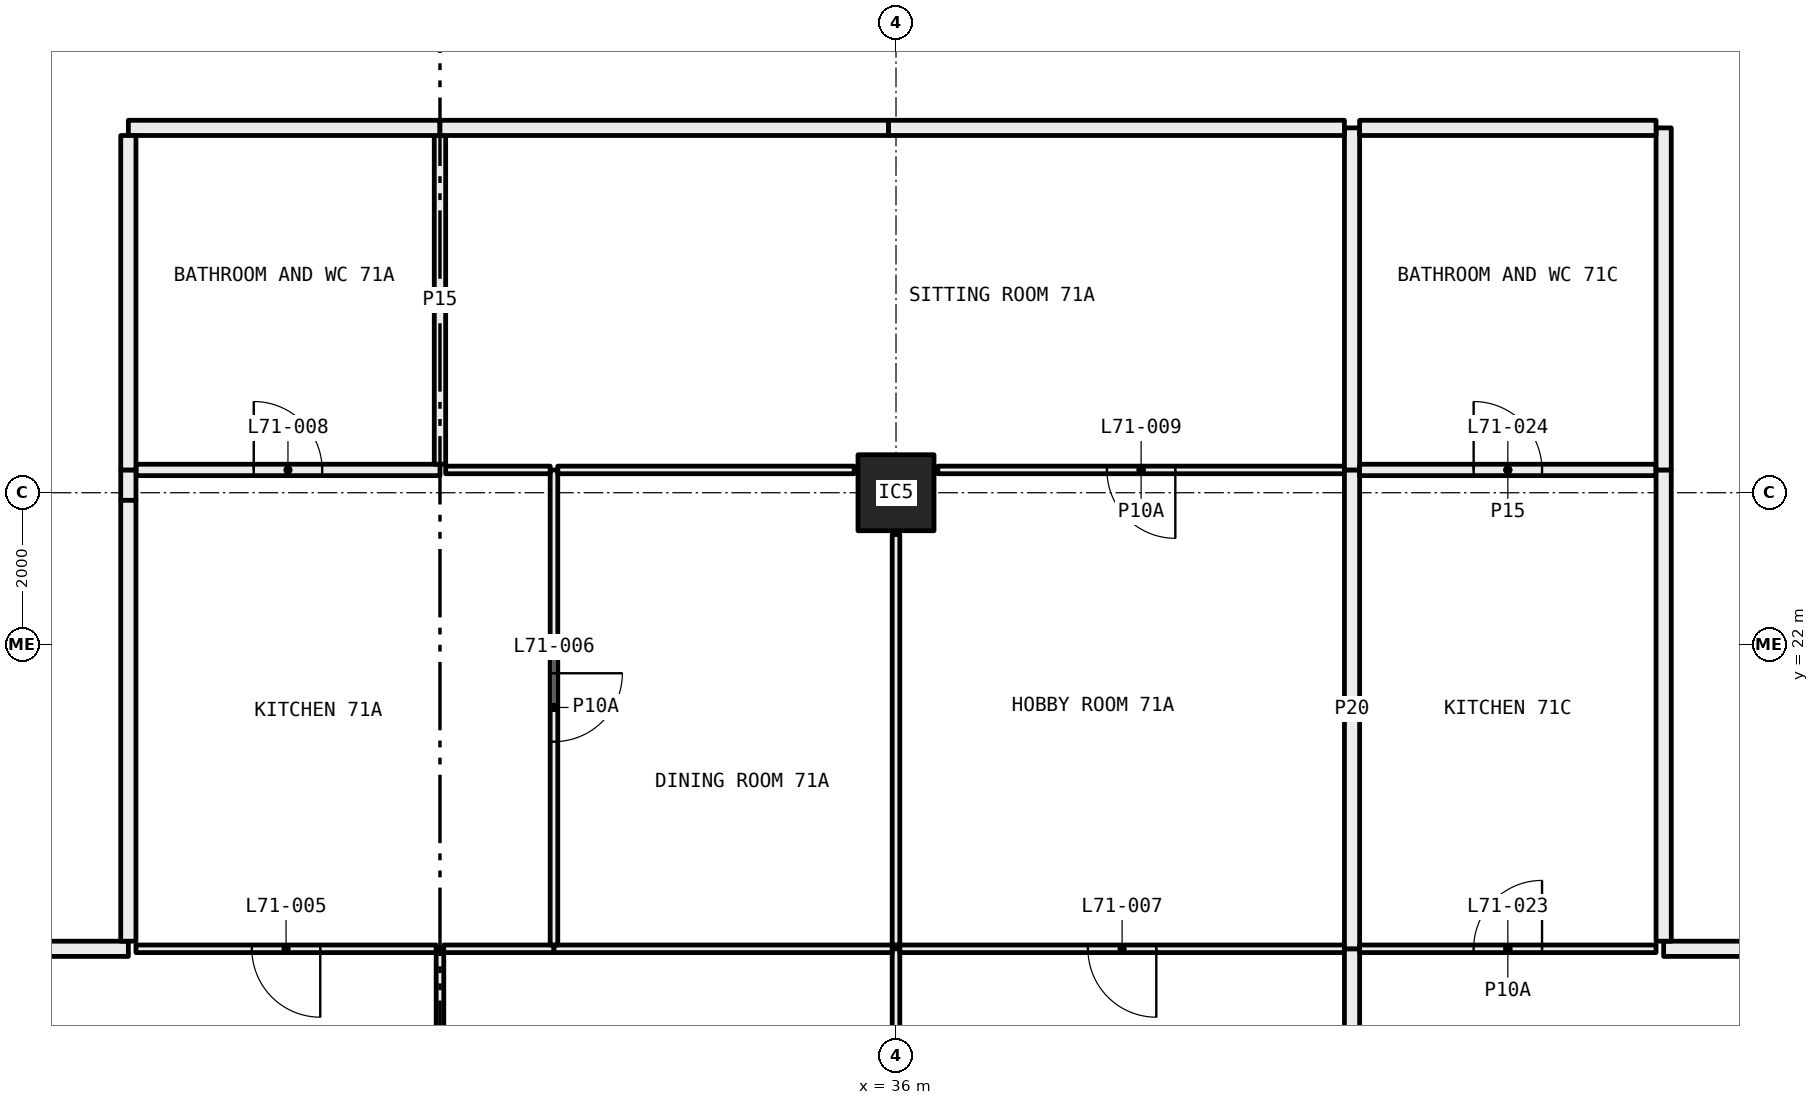
"""IFC4 building model, lengths in metres.
Left out: names, types, materials, properties, quantities, classifications, styles, units other than length and angle.
Written with IfcOpenShell. Run it as: python <this file> out.ifc"""

import sys

from ifc_helpers import new_model, si_unit, direction, frame, frame_2d, origin, origin_2d, place, context, subcontext, project, spatial, rectangle, hollow_rectangle, extrude, element, fill, save


model = new_model("IFC4")
c1 = context("Model", 3, precision=1e-05, world=origin(), true_north=direction((0.0, 1.0)))
c2 = subcontext(c1, "Body", "Model", "MODEL_VIEW")
j1 = project(units=[si_unit("LENGTHUNIT", "METRE"), si_unit("PLANEANGLEUNIT", "RADIAN")], contexts=[c1])
p1 = place(None, origin())
s1 = spatial("IfcSite", under=j1, at=p1, CompositionType="ELEMENT")
p2 = place(p1, origin())
s2 = spatial("IfcBuilding", under=s1, at=p2, CompositionType="ELEMENT")
p3 = place(p2, frame((0.0, 0.0, 262.8)))
s3 = spatial("IfcBuildingStorey", under=s2, at=p3, CompositionType="ELEMENT", Elevation=262.8)
p4 = place(p3, frame((36.0, 24.0, 0.0), z_axis=(0.0, 0.0, 1.0), x_axis=(1.0, 0.0, 0.0)))
e1 = element("IfcColumn", 1, at=p4, inside=s3, PredefinedType="COLUMN", context=c2, shape_type="SweptSolid", body=[
    extrude(hollow_rectangle(XDim=1.0, YDim=1.0, WallThickness=0.04, at=origin_2d()), origin(), (0.0, 0.0, 1.0), 3.05),
])
p5 = place(p3, frame((30.0, 12.72, 0.0), z_axis=(0.0, 0.0, 1.0), x_axis=(0.0, 1.0, 0.0)))
e2 = element("IfcWall", 2, at=p5, inside=s3, PredefinedType="PARTITIONING", context=c2, shape_type="SweptSolid", body=[
    extrude(rectangle(XDim=5.28, YDim=0.1, at=frame_2d((2.64, 0.0))), origin(), (0.0, 0.0, 1.0), 3.05),
])
p6 = place(p5, frame((2.19, 0.0, 0.0)))
e3 = element("IfcOpeningElement", 3, at=p6, cuts=e2, PredefinedType="OPENING", context=c2, shape_type="SweptSolid", body=[
    extrude(rectangle(XDim=0.9, YDim=2.1, at=frame_2d((0.45, 1.05))), frame((0.0, 0.06, 0.0), z_axis=(0.0, -1.0, 0.0), x_axis=(1.0, 0.0, 0.0)), (0.0, 0.0, 1.0), 0.12),
])
p7 = place(p3, frame((29.95, 18.0, 0.0), z_axis=(0.0, 0.0, 1.0), x_axis=(-1.0, 0.0, 0.0)))
e4 = element("IfcWall", 4, at=p7, inside=s3, PredefinedType="PARTITIONING", context=c2, shape_type="SweptSolid", body=[
    extrude(rectangle(XDim=3.95, YDim=0.1, at=frame_2d((1.975, 0.0))), origin(), (0.0, 0.0, 1.0), 3.05),
])
p8 = place(p7, frame((1.525, 0.0, 0.0)))
e5 = element("IfcOpeningElement", 5, at=p8, cuts=e4, PredefinedType="OPENING", context=c2, shape_type="SweptSolid", body=[
    extrude(rectangle(XDim=0.9, YDim=2.1, at=frame_2d((0.45, 1.05))), frame((0.0, 0.06, 0.0), z_axis=(0.0, -1.0, 0.0), x_axis=(1.0, 0.0, 0.0)), (0.0, 0.0, 1.0), 0.12),
])
p9 = place(p3, frame((25.9, 18.0, 0.0), z_axis=(0.0, 0.0, 1.0), x_axis=(-1.0, 0.0, 0.0)))
e6 = element("IfcWall", 6, at=p9, inside=s3, PredefinedType="PARTITIONING", context=c2, shape_type="SweptSolid", body=[
    extrude(rectangle(XDim=1.9, YDim=0.2, at=frame_2d((0.95, 0.0))), origin(), (0.0, 0.0, 1.0), 3.05),
])
p10 = place(p3, frame((36.0, 12.72, 0.0), z_axis=(0.0, 0.0, 1.0), x_axis=(0.0, 1.0, 0.0)))
e7 = element("IfcWall", 7, at=p10, inside=s3, PredefinedType="PARTITIONING", context=c2, shape_type="SweptSolid", body=[
    extrude(rectangle(XDim=5.28, YDim=0.1, at=frame_2d((2.64, 0.0))), origin(), (0.0, 0.0, 1.0), 2.45),
])
p11 = place(p10, frame((2.19, 0.0, 0.0)))
e8 = element("IfcOpeningElement", 8, at=p11, cuts=e7, PredefinedType="OPENING", context=c2, shape_type="SweptSolid", body=[
    extrude(rectangle(XDim=0.9, YDim=2.1, at=frame_2d((0.45, 1.05))), frame((0.0, 0.06, 0.0), z_axis=(0.0, -1.0, 0.0), x_axis=(1.0, 0.0, 0.0)), (0.0, 0.0, 1.0), 0.12),
])
p12 = place(p3, frame((31.5, 18.0, 0.0), z_axis=(0.0, 0.0, 1.0), x_axis=(-1.0, 0.0, 0.0)))
e9 = element("IfcWall", 9, at=p12, inside=s3, PredefinedType="PARTITIONING", context=c2, shape_type="SweptSolid", body=[
    extrude(rectangle(XDim=1.45, YDim=0.1, at=frame_2d((0.725, 0.0))), origin(), (0.0, 0.0, 1.0), 3.05),
])
p13 = place(p3, frame((35.95, 18.0, 0.0), z_axis=(0.0, 0.0, 1.0), x_axis=(-1.0, 0.0, 0.0)))
e10 = element("IfcWall", 10, at=p13, inside=s3, PredefinedType="PARTITIONING", context=c2, shape_type="SweptSolid", body=[
    extrude(rectangle(XDim=4.45, YDim=0.1, at=frame_2d((2.225, 0.0))), origin(), (0.0, 0.0, 1.0), 2.45),
])
p14 = place(p3, frame((41.9, 18.0, 0.0), z_axis=(0.0, 0.0, 1.0), x_axis=(-1.0, 0.0, 0.0)))
e11 = element("IfcWall", 11, at=p14, inside=s3, PredefinedType="PARTITIONING", context=c2, shape_type="SweptSolid", body=[
    extrude(rectangle(XDim=5.85, YDim=0.1, at=frame_2d((2.925, 0.0))), origin(), (0.0, 0.0, 1.0), 2.45),
])
p15 = place(p14, frame((2.475, 0.0, 0.0)))
e12 = element("IfcOpeningElement", 12, at=p15, cuts=e11, PredefinedType="OPENING", context=c2, shape_type="SweptSolid", body=[
    extrude(rectangle(XDim=0.9, YDim=2.1, at=frame_2d((0.45, 1.05))), frame((0.0, 0.06, 0.0), z_axis=(0.0, -1.0, 0.0), x_axis=(1.0, 0.0, 0.0)), (0.0, 0.0, 1.0), 0.12),
])
p16 = place(p3, frame((42.0, 12.72, 0.0), z_axis=(0.0, 0.0, 1.0), x_axis=(0.0, 1.0, 0.0)))
e13 = element("IfcWall", 13, at=p16, inside=s3, PredefinedType="PARTITIONING", context=c2, shape_type="SweptSolid", body=[
    extrude(rectangle(XDim=5.28, YDim=0.2, at=frame_2d((2.64, 0.0))), origin(), (0.0, 0.0, 1.0), 3.05),
])
p17 = place(p3, frame((31.5, 18.05, 0.0), z_axis=(0.0, 0.0, 1.0), x_axis=(0.0, 1.0, 0.0)))
e14 = element("IfcWall", 14, at=p17, inside=s3, PredefinedType="PARTITIONING", context=c2, shape_type="SweptSolid", body=[
    extrude(rectangle(XDim=6.25, YDim=0.1, at=frame_2d((3.125, 0.0))), origin(), (0.0, 0.0, 1.0), 2.45),
])
p18 = place(p17, frame((2.675, 0.0, 0.0)))
e15 = element("IfcOpeningElement", 15, at=p18, cuts=e14, PredefinedType="OPENING", context=c2, shape_type="SweptSolid", body=[
    extrude(rectangle(XDim=0.9, YDim=2.1, at=frame_2d((0.45, 1.05))), frame((0.0, 0.06, 0.0), z_axis=(0.0, -1.0, 0.0), x_axis=(1.0, 0.0, 0.0)), (0.0, 0.0, 1.0), 0.12),
])
p19 = place(p3, frame((30.0, 24.3, 0.0), z_axis=(0.0, 0.0, 1.0), x_axis=(-1.0, 0.0, 0.0)))
e16 = element("IfcWall", 16, at=p19, inside=s3, PredefinedType="PARTITIONING", context=c2, shape_type="SweptSolid", body=[
    extrude(rectangle(XDim=4.0, YDim=0.15, at=frame_2d((2.0, 0.0))), origin(), (0.0, 0.0, 1.0), 3.05),
])
p20 = place(p19, frame((1.55, 0.0, 0.0)))
e17 = element("IfcOpeningElement", 17, at=p20, cuts=e16, PredefinedType="OPENING", context=c2, shape_type="SweptSolid", body=[
    extrude(rectangle(XDim=0.9, YDim=2.1, at=frame_2d((0.45, 1.05))), frame((0.0, 0.085, 0.0), z_axis=(0.0, -1.0, 0.0), x_axis=(1.0, 0.0, 0.0)), (0.0, 0.0, 1.0), 0.17),
])
p21 = place(p3, frame((31.45, 24.3, 0.0), z_axis=(0.0, 0.0, 1.0), x_axis=(-1.0, 0.0, 0.0)))
e18 = element("IfcWall", 18, at=p21, inside=s3, PredefinedType="PARTITIONING", context=c2, shape_type="SweptSolid", body=[
    extrude(rectangle(XDim=1.375, YDim=0.1, at=frame_2d((0.688, 0.0))), origin(), (0.0, 0.0, 1.0), 3.05),
])
p22 = place(p3, frame((25.9, 24.3, 0.0), z_axis=(0.0, 0.0, 1.0), x_axis=(0.0, -1.0, 0.0)))
e19 = element("IfcWall", 19, at=p22, inside=s3, PredefinedType="PARTITIONING", context=c2, shape_type="SweptSolid", body=[
    extrude(rectangle(XDim=0.4, YDim=0.2, at=frame_2d((0.2, 0.0))), origin(), (0.0, 0.0, 1.0), 2.45),
])
p23 = place(p3, frame((25.9, 23.9, 0.0), z_axis=(0.0, 0.0, 1.0), x_axis=(0.0, -1.0, 0.0)))
e20 = element("IfcWall", 20, at=p23, inside=s3, PredefinedType="PARTITIONING", context=c2, shape_type="SweptSolid", body=[
    extrude(rectangle(XDim=5.8, YDim=0.2, at=frame_2d((2.9, 0.0))), origin(), (0.0, 0.0, 1.0), 3.05),
])
p24 = place(p3, frame((36.0, 18.05, 0.0), z_axis=(0.0, 0.0, 1.0), x_axis=(0.0, 1.0, 0.0)))
e21 = element("IfcWall", 21, at=p24, inside=s3, PredefinedType="PARTITIONING", context=c2, shape_type="SweptSolid", body=[
    extrude(rectangle(XDim=5.4, YDim=0.1, at=frame_2d((2.7, 0.0))), origin(), (0.0, 0.0, 1.0), 2.45),
])
p25 = place(p3, frame((35.45, 24.3, 0.0), z_axis=(0.0, 0.0, 1.0), x_axis=(-1.0, 0.0, 0.0)))
e22 = element("IfcWall", 22, at=p25, inside=s3, PredefinedType="PARTITIONING", context=c2, shape_type="SweptSolid", body=[
    extrude(rectangle(XDim=3.9, YDim=0.1, at=frame_2d((1.95, 0.0))), origin(), (0.0, 0.0, 1.0), 3.05),
])
p26 = place(p3, frame((41.9, 24.3, 0.0), z_axis=(0.0, 0.0, 1.0), x_axis=(-1.0, 0.0, 0.0)))
e23 = element("IfcWall", 23, at=p26, inside=s3, PredefinedType="PARTITIONING", context=c2, shape_type="SweptSolid", body=[
    extrude(rectangle(XDim=5.35, YDim=0.1, at=frame_2d((2.675, 0.0))), origin(), (0.0, 0.0, 1.0), 3.05),
])
p27 = place(p26, frame((2.225, 0.0, 0.0)))
e24 = element("IfcOpeningElement", 24, at=p27, cuts=e23, PredefinedType="OPENING", context=c2, shape_type="SweptSolid", body=[
    extrude(rectangle(XDim=0.9, YDim=2.1, at=frame_2d((0.45, 1.05))), frame((0.0, 0.06, 0.0), z_axis=(0.0, -1.0, 0.0), x_axis=(1.0, 0.0, 0.0)), (0.0, 0.0, 1.0), 0.12),
])
p28 = place(p3, frame((42.0, 18.0, 0.0), z_axis=(0.0, 0.0, 1.0), x_axis=(0.0, 1.0, 0.0)))
e25 = element("IfcWall", 25, at=p28, inside=s3, PredefinedType="PARTITIONING", context=c2, shape_type="SweptSolid", body=[
    extrude(rectangle(XDim=6.3, YDim=0.2, at=frame_2d((3.15, 0.0))), origin(), (0.0, 0.0, 1.0), 2.45),
])
p29 = place(p3, frame((30.0, 24.375, 0.0), z_axis=(0.0, 0.0, 1.0), x_axis=(0.0, 1.0, 0.0)))
e26 = element("IfcWall", 26, at=p29, inside=s3, PredefinedType="PARTITIONING", context=c2, shape_type="SweptSolid", body=[
    extrude(rectangle(XDim=4.325, YDim=0.15, at=frame_2d((2.163, 0.0))), origin(), (0.0, 0.0, 1.0), 3.05),
])
p30 = place(p3, frame((30.0, 28.8, 0.0), z_axis=(0.0, 0.0, 1.0), x_axis=(-1.0, 0.0, 0.0)))
e27 = element("IfcWall", 27, at=p30, inside=s3, PredefinedType="PARTITIONING", context=c2, shape_type="SweptSolid", body=[
    extrude(rectangle(XDim=4.1, YDim=0.2, at=frame_2d((2.05, 0.0))), origin(), (0.0, 0.0, 1.0), 3.05),
])
p31 = place(p3, frame((25.9, 28.7, 0.0), z_axis=(0.0, 0.0, 1.0), x_axis=(0.0, -1.0, 0.0)))
e28 = element("IfcWall", 28, at=p31, inside=s3, PredefinedType="PARTITIONING", context=c2, shape_type="SweptSolid", body=[
    extrude(rectangle(XDim=4.4, YDim=0.2, at=frame_2d((2.2, 0.0))), origin(), (0.0, 0.0, 1.0), 3.05),
])
p32 = place(p3, frame((42.0, 24.3, 0.0), z_axis=(0.0, 0.0, 1.0), x_axis=(0.0, 1.0, 0.0)))
e29 = element("IfcWall", 29, at=p32, inside=s3, PredefinedType="PARTITIONING", context=c2, shape_type="SweptSolid", body=[
    extrude(rectangle(XDim=4.5, YDim=0.2, at=frame_2d((2.25, 0.0))), origin(), (0.0, 0.0, 1.0), 3.05),
])
p33 = place(p3, frame((41.9, 28.8, 0.0), z_axis=(0.0, 0.0, 1.0), x_axis=(-1.0, 0.0, 0.0)))
e30 = element("IfcWall", 30, at=p33, inside=s3, PredefinedType="PARTITIONING", context=c2, shape_type="SweptSolid", body=[
    extrude(rectangle(XDim=6.0, YDim=0.2, at=frame_2d((3.0, 0.0))), origin(), (0.0, 0.0, 1.0), 2.45),
])
p34 = place(p3, frame((35.9, 28.8, 0.0), z_axis=(0.0, 0.0, 1.0), x_axis=(-1.0, 0.0, 0.0)))
e31 = element("IfcWall", 31, at=p34, inside=s3, PredefinedType="PARTITIONING", context=c2, shape_type="SweptSolid", body=[
    extrude(rectangle(XDim=5.9, YDim=0.2, at=frame_2d((2.95, 0.0))), origin(), (0.0, 0.0, 1.0), 3.05),
])
p35 = place(p3, frame((46.0, 18.0, 0.0), z_axis=(0.0, 0.0, 1.0), x_axis=(-1.0, 0.0, 0.0)))
e32 = element("IfcWall", 32, at=p35, inside=s3, PredefinedType="PARTITIONING", context=c2, shape_type="SweptSolid", body=[
    extrude(rectangle(XDim=3.9, YDim=0.1, at=frame_2d((1.95, 0.0))), origin(), (0.0, 0.0, 1.0), 3.05),
])
p36 = place(p35, frame((1.5, 0.0, 0.0)))
e33 = element("IfcOpeningElement", 33, at=p36, cuts=e32, PredefinedType="OPENING", context=c2, shape_type="SweptSolid", body=[
    extrude(rectangle(XDim=0.9, YDim=2.1, at=frame_2d((0.45, 1.05))), frame((0.0, 0.06, 0.0), z_axis=(0.0, -1.0, 0.0), x_axis=(1.0, 0.0, 0.0)), (0.0, 0.0, 1.0), 0.12),
])
p37 = place(p3, frame((48.0, 18.0, 0.0), z_axis=(0.0, 0.0, 1.0), x_axis=(-1.0, 0.0, 0.0)))
e34 = element("IfcWall", 34, at=p37, inside=s3, PredefinedType="PARTITIONING", context=c2, shape_type="SweptSolid", body=[
    extrude(rectangle(XDim=1.9, YDim=0.2, at=frame_2d((0.95, 0.0))), origin(), (0.0, 0.0, 1.0), 3.05),
])
p38 = place(p3, frame((46.0, 24.3, 0.0), z_axis=(0.0, 0.0, 1.0), x_axis=(-1.0, 0.0, 0.0)))
e35 = element("IfcWall", 35, at=p38, inside=s3, PredefinedType="PARTITIONING", context=c2, shape_type="SweptSolid", body=[
    extrude(rectangle(XDim=3.9, YDim=0.15, at=frame_2d((1.95, 0.0))), origin(), (0.0, 0.0, 1.0), 3.05),
])
p39 = place(p38, frame((1.5, 0.0, 0.0)))
e36 = element("IfcOpeningElement", 36, at=p39, cuts=e35, PredefinedType="OPENING", context=c2, shape_type="SweptSolid", body=[
    extrude(rectangle(XDim=0.9, YDim=2.1, at=frame_2d((0.45, 1.05))), frame((0.0, 0.085, 0.0), z_axis=(0.0, -1.0, 0.0), x_axis=(1.0, 0.0, 0.0)), (0.0, 0.0, 1.0), 0.17),
])
p40 = place(p3, frame((46.1, 18.1, 0.0), z_axis=(0.0, 0.0, 1.0), x_axis=(0.0, 1.0, 0.0)))
e37 = element("IfcWall", 37, at=p40, inside=s3, PredefinedType="PARTITIONING", context=c2, shape_type="SweptSolid", body=[
    extrude(rectangle(XDim=6.2, YDim=0.2, at=frame_2d((3.1, 0.0))), origin(), (0.0, 0.0, 1.0), 2.45),
])
p41 = place(p3, frame((46.1, 24.3, 0.0), z_axis=(0.0, 0.0, 1.0), x_axis=(0.0, 1.0, 0.0)))
e38 = element("IfcWall", 38, at=p41, inside=s3, PredefinedType="PARTITIONING", context=c2, shape_type="SweptSolid", body=[
    extrude(rectangle(XDim=4.5, YDim=0.2, at=frame_2d((2.25, 0.0))), origin(), (0.0, 0.0, 1.0), 3.05),
])
p42 = place(p3, frame((46.0, 28.8, 0.0), z_axis=(0.0, 0.0, 1.0), x_axis=(-1.0, 0.0, 0.0)))
e39 = element("IfcWall", 39, at=p42, inside=s3, PredefinedType="PARTITIONING", context=c2, shape_type="SweptSolid", body=[
    extrude(rectangle(XDim=3.9, YDim=0.2, at=frame_2d((1.95, 0.0))), origin(), (0.0, 0.0, 1.0), 3.05),
])
p43 = place(p8, origin())
e40 = element("IfcDoor", 40, at=p43, inside=s3, OperationType="SINGLE_SWING_RIGHT", PredefinedType="DOOR", context=c2, shape_type="SweptSolid", body=[
    extrude(rectangle(XDim=0.9, YDim=2.1, at=frame_2d((0.45, 1.05))), frame((0.0, 0.025, 0.0), z_axis=(0.0, -1.0, 0.0), x_axis=(1.0, 0.0, 0.0)), (0.0, 0.0, 1.0), 0.05),
])
fill(e5, e40)
p44 = place(p18, frame((0.9, 0.0, 0.0), x_axis=(-1.0, 0.0, 0.0)))
e41 = element("IfcDoor", 41, at=p44, inside=s3, OperationType="SINGLE_SWING_RIGHT", PredefinedType="DOOR", context=c2, shape_type="SweptSolid", body=[
    extrude(rectangle(XDim=0.9, YDim=2.1, at=frame_2d((0.45, 1.05))), frame((0.0, 0.025, 0.0), z_axis=(0.0, -1.0, 0.0), x_axis=(1.0, 0.0, 0.0)), (0.0, 0.0, 1.0), 0.05),
])
fill(e15, e41)
p45 = place(p15, origin())
e42 = element("IfcDoor", 42, at=p45, inside=s3, OperationType="SINGLE_SWING_RIGHT", PredefinedType="DOOR", context=c2, shape_type="SweptSolid", body=[
    extrude(rectangle(XDim=0.9, YDim=2.1, at=frame_2d((0.45, 1.05))), frame((0.0, 0.025, 0.0), z_axis=(0.0, -1.0, 0.0), x_axis=(1.0, 0.0, 0.0)), (0.0, 0.0, 1.0), 0.05),
])
fill(e12, e42)
p46 = place(p20, frame((0.9, 0.0, 0.0), x_axis=(-1.0, 0.0, 0.0)))
e43 = element("IfcDoor", 43, at=p46, inside=s3, OperationType="SINGLE_SWING_RIGHT", PredefinedType="DOOR", context=c2, shape_type="SweptSolid", body=[
    extrude(rectangle(XDim=0.9, YDim=2.1, at=frame_2d((0.45, 1.05))), frame((0.0, 0.025, 0.0), z_axis=(0.0, -1.0, 0.0), x_axis=(1.0, 0.0, 0.0)), (0.0, 0.0, 1.0), 0.05),
])
fill(e17, e43)
p47 = place(p27, origin())
e44 = element("IfcDoor", 44, at=p47, inside=s3, OperationType="SINGLE_SWING_RIGHT", PredefinedType="DOOR", context=c2, shape_type="SweptSolid", body=[
    extrude(rectangle(XDim=0.9, YDim=2.1, at=frame_2d((0.45, 1.05))), frame((0.0, 0.025, 0.0), z_axis=(0.0, -1.0, 0.0), x_axis=(1.0, 0.0, 0.0)), (0.0, 0.0, 1.0), 0.05),
])
fill(e24, e44)
p48 = place(p36, frame((0.9, 0.0, 0.0), x_axis=(-1.0, 0.0, 0.0)))
e45 = element("IfcDoor", 45, at=p48, inside=s3, OperationType="SINGLE_SWING_LEFT", PredefinedType="DOOR", context=c2, shape_type="SweptSolid", body=[
    extrude(rectangle(XDim=0.9, YDim=2.1, at=frame_2d((0.45, 1.05))), frame((0.0, 0.025, 0.0), z_axis=(0.0, -1.0, 0.0), x_axis=(1.0, 0.0, 0.0)), (0.0, 0.0, 1.0), 0.05),
])
fill(e33, e45)
p49 = place(p39, frame((0.9, 0.0, 0.0), x_axis=(-1.0, 0.0, 0.0)))
e46 = element("IfcDoor", 46, at=p49, inside=s3, OperationType="SINGLE_SWING_RIGHT", PredefinedType="DOOR", context=c2, shape_type="SweptSolid", body=[
    extrude(rectangle(XDim=0.9, YDim=2.1, at=frame_2d((0.45, 1.05))), frame((0.0, 0.025, 0.0), z_axis=(0.0, -1.0, 0.0), x_axis=(1.0, 0.0, 0.0)), (0.0, 0.0, 1.0), 0.05),
])
fill(e36, e46)
save(model, sys.argv[1])
